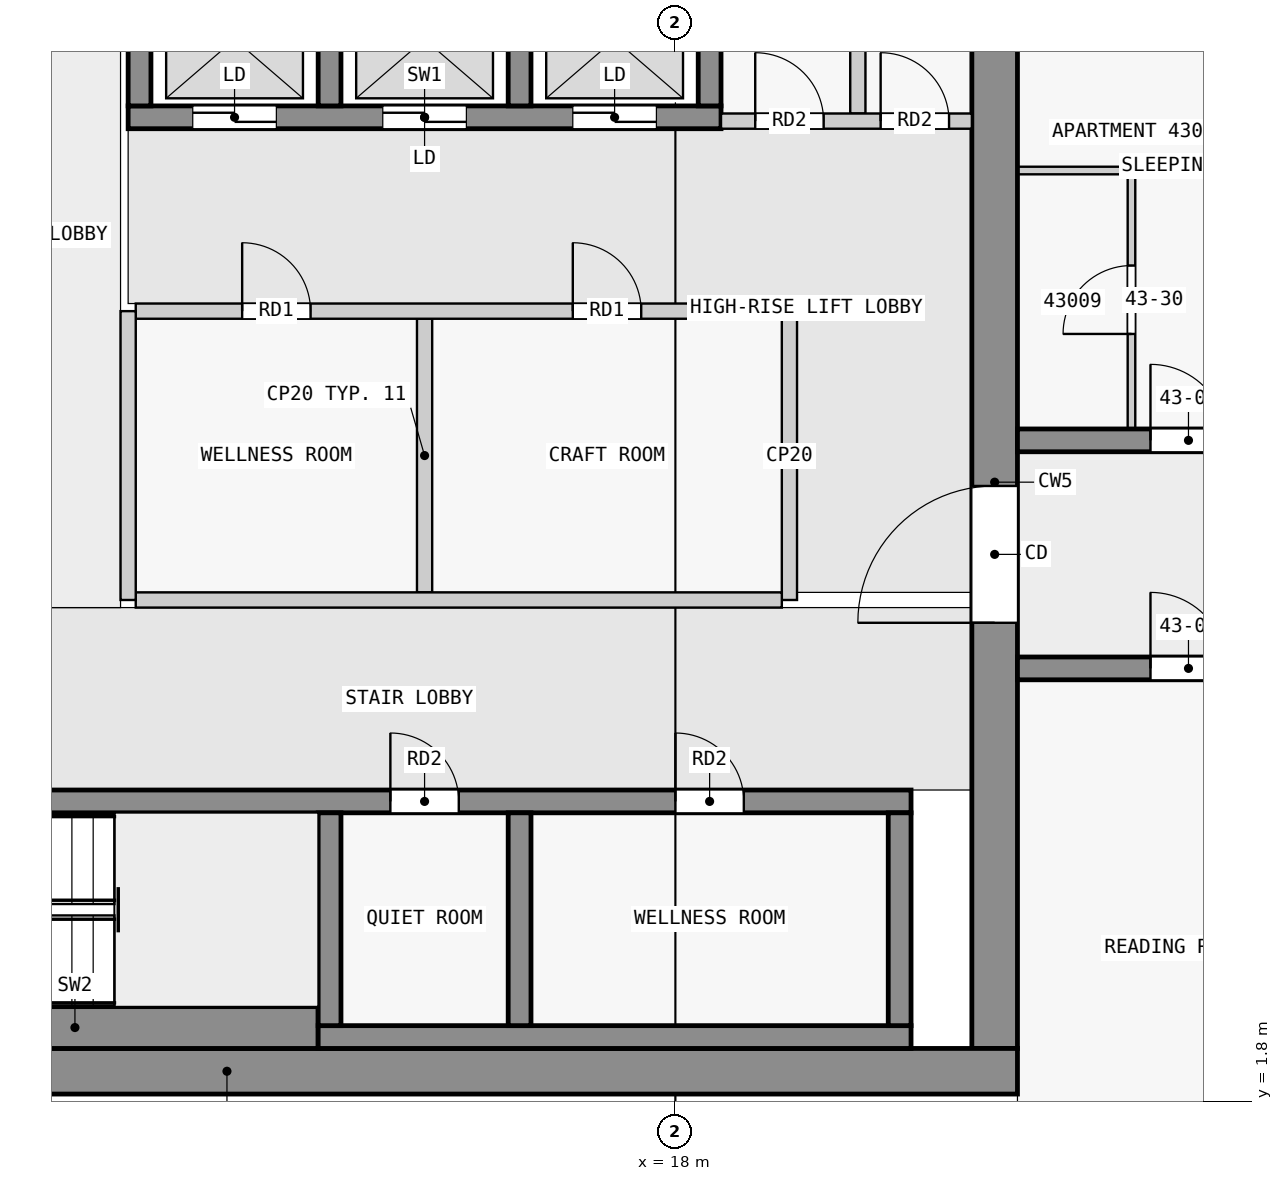
"""IFC4 building model, lengths in metres.
Left out: names, types, materials, properties, quantities, classifications, styles, units other than length and angle.
Written with IfcOpenShell. Run it as: python <this file> out.ifc"""

import sys

from ifc_helpers import new_model, si_unit, direction, frame, frame_2d, origin, place, context, subcontext, project, spatial, rectangle, extrude, element, fill, save


model = new_model("IFC4")
c1 = context("Model", 3, precision=1e-05, world=origin(), true_north=direction((0.0, 1.0)))
c2 = subcontext(c1, "Body", "Model", "MODEL_VIEW")
j1 = project(units=[si_unit("LENGTHUNIT", "METRE"), si_unit("PLANEANGLEUNIT", "RADIAN")], contexts=[c1])
p1 = place(None, origin())
s1 = spatial("IfcSite", under=j1, at=p1, CompositionType="ELEMENT")
p2 = place(p1, origin())
s2 = spatial("IfcBuilding", under=s1, at=p2, CompositionType="ELEMENT")
p3 = place(p2, frame((0.0, 0.0, 167.4)))
s3 = spatial("IfcBuildingStorey", under=s2, at=p3, CompositionType="ELEMENT", Elevation=167.4)
p4 = place(p3, frame((1.7, 2.2, 0.0), z_axis=(0.0, 0.0, 1.0), x_axis=(1.0, 0.0, 0.0)))
e1 = element("IfcWall", 1, at=p4, inside=s3, PredefinedType="SHEAR", context=c2, shape_type="SweptSolid", body=[
    extrude(rectangle(XDim=20.8, YDim=0.6, at=frame_2d((10.4, 0.0))), origin(), (0.0, 0.0, 1.0), 3.25),
])
p5 = place(p3, frame((22.2, 2.5, 0.0), z_axis=(0.0, 0.0, 1.0), x_axis=(0.0, 1.0, 0.0)))
e2 = element("IfcWall", 2, at=p5, inside=s3, PredefinedType="SHEAR", context=c2, shape_type="SweptSolid", body=[
    extrude(rectangle(XDim=14.9, YDim=0.6, at=frame_2d((7.45, 0.0))), origin(), (0.0, 0.0, 1.0), 3.25),
])
p6 = place(p5, frame((5.6, 0.0, 0.0)))
e3 = element("IfcOpeningElement", 3, at=p6, cuts=e2, PredefinedType="OPENING", context=c2, shape_type="SweptSolid", body=[
    extrude(rectangle(XDim=1.8, YDim=2.1, at=frame_2d((0.9, 1.05))), frame((0.0, 0.31, 0.0), z_axis=(0.0, -1.0, 0.0), x_axis=(1.0, 0.0, 0.0)), (0.0, 0.0, 1.0), 0.62),
])
p7 = place(p3, frame((6.9, 2.775, 0.0), z_axis=(0.0, 0.0, 1.0), x_axis=(1.0, 0.0, 0.0)))
e4 = element("IfcWall", 4, at=p7, inside=s3, PredefinedType="SHEAR", context=c2, shape_type="SweptSolid", body=[
    extrude(rectangle(XDim=6.4, YDim=0.55, at=frame_2d((3.2, 0.0))), origin(), (0.0, 0.0, 1.0), 3.25),
])
p8 = place(p3, frame((13.3, 2.65, 0.0), z_axis=(0.0, 0.0, 1.0), x_axis=(1.0, 0.0, 0.0)))
e5 = element("IfcWall", 5, at=p8, inside=s3, PredefinedType="SHEAR", context=c2, shape_type="SweptSolid", body=[
    extrude(rectangle(XDim=7.8, YDim=0.3, at=frame_2d((3.9, 0.0))), origin(), (0.0, 0.0, 1.0), 3.25),
])
for number, where, z_axis, x_axis in (
    (6, (13.45, 2.8, 0.0), (0.0, 0.0, 1.0), (0.0, 1.0, 0.0)),
    (7, (15.95, 2.8, 0.0), (0.0, 0.0, 1.0), (0.0, 1.0, 0.0)),
    (8, (20.95, 2.8, 0.0), (0.0, 0.0, 1.0), (0.0, 1.0, 0.0)),
):
    element("IfcWall", number, at=place(p3, frame(where, z_axis=z_axis, x_axis=x_axis)), inside=s3, PredefinedType="SHEAR", context=c2, shape_type="SweptSolid", body=[
        extrude(rectangle(XDim=2.8, YDim=0.3, at=frame_2d((1.4, 0.0))), origin(), (0.0, 0.0, 1.0), 3.25),
    ])
p9 = place(p3, frame((2.3, 5.75, 0.0), z_axis=(0.0, 0.0, 1.0), x_axis=(1.0, 0.0, 0.0)))
e9 = element("IfcWall", 9, at=p9, inside=s3, PredefinedType="SHEAR", context=c2, shape_type="SweptSolid", body=[
    extrude(rectangle(XDim=18.8, YDim=0.3, at=frame_2d((9.4, 0.0))), origin(), (0.0, 0.0, 1.0), 3.25),
])
p10 = place(p9, frame((4.65, 0.0, 0.0)))
e10 = element("IfcOpeningElement", 10, at=p10, cuts=e9, PredefinedType="OPENING", context=c2, shape_type="SweptSolid", body=[
    extrude(rectangle(XDim=1.1, YDim=2.1, at=frame_2d((0.55, 1.05))), frame((0.0, 0.16, 0.0), z_axis=(0.0, -1.0, 0.0), x_axis=(1.0, 0.0, 0.0)), (0.0, 0.0, 1.0), 0.32),
])
p11 = place(p9, frame((0.45, 0.0, 0.0)))
e11 = element("IfcOpeningElement", 11, at=p11, cuts=e9, PredefinedType="OPENING", context=c2, shape_type="SweptSolid", body=[
    extrude(rectangle(XDim=1.1, YDim=2.1, at=frame_2d((0.55, 1.05))), frame((0.0, 0.16, 0.0), z_axis=(0.0, -1.0, 0.0), x_axis=(1.0, 0.0, 0.0)), (0.0, 0.0, 1.0), 0.32),
])
p12 = place(p9, frame((2.75, 0.0, 0.0)))
e12 = element("IfcOpeningElement", 12, at=p12, cuts=e9, PredefinedType="OPENING", context=c2, shape_type="SweptSolid", body=[
    extrude(rectangle(XDim=1.1, YDim=2.1, at=frame_2d((0.55, 1.05))), frame((0.0, 0.16, 0.0), z_axis=(0.0, -1.0, 0.0), x_axis=(1.0, 0.0, 0.0)), (0.0, 0.0, 1.0), 0.32),
])
p13 = place(p9, frame((11.95, 0.0, 0.0)))
e13 = element("IfcOpeningElement", 13, at=p13, cuts=e9, PredefinedType="OPENING", context=c2, shape_type="SweptSolid", body=[
    extrude(rectangle(XDim=0.9, YDim=2.1, at=frame_2d((0.45, 1.05))), frame((0.0, 0.16, 0.0), z_axis=(0.0, -1.0, 0.0), x_axis=(1.0, 0.0, 0.0)), (0.0, 0.0, 1.0), 0.32),
])
p14 = place(p9, frame((15.7, 0.0, 0.0)))
e14 = element("IfcOpeningElement", 14, at=p14, cuts=e9, PredefinedType="OPENING", context=c2, shape_type="SweptSolid", body=[
    extrude(rectangle(XDim=0.9, YDim=2.1, at=frame_2d((0.45, 1.05))), frame((0.0, 0.16, 0.0), z_axis=(0.0, -1.0, 0.0), x_axis=(1.0, 0.0, 0.0)), (0.0, 0.0, 1.0), 0.32),
])
p15 = place(p3, frame((10.8, 14.75, 0.0), z_axis=(0.0, 0.0, 1.0), x_axis=(1.0, 0.0, 0.0)))
e15 = element("IfcWall", 15, at=p15, inside=s3, PredefinedType="SHEAR", context=c2, shape_type="SweptSolid", body=[
    extrude(rectangle(XDim=7.8, YDim=0.3, at=frame_2d((3.9, 0.0))), origin(), (0.0, 0.0, 1.0), 3.25),
])
p16 = place(p15, frame((0.85, 0.0, 0.0)))
e16 = element("IfcOpeningElement", 16, at=p16, cuts=e15, PredefinedType="OPENING", context=c2, shape_type="SweptSolid", body=[
    extrude(rectangle(XDim=1.1, YDim=2.1, at=frame_2d((0.55, 1.05))), frame((0.0, 0.16, 0.0), z_axis=(0.0, -1.0, 0.0), x_axis=(1.0, 0.0, 0.0)), (0.0, 0.0, 1.0), 0.32),
])
p17 = place(p15, frame((3.35, 0.0, 0.0)))
e17 = element("IfcOpeningElement", 17, at=p17, cuts=e15, PredefinedType="OPENING", context=c2, shape_type="SweptSolid", body=[
    extrude(rectangle(XDim=1.1, YDim=2.1, at=frame_2d((0.55, 1.05))), frame((0.0, 0.16, 0.0), z_axis=(0.0, -1.0, 0.0), x_axis=(1.0, 0.0, 0.0)), (0.0, 0.0, 1.0), 0.32),
])
p18 = place(p15, frame((5.85, 0.0, 0.0)))
e18 = element("IfcOpeningElement", 18, at=p18, cuts=e15, PredefinedType="OPENING", context=c2, shape_type="SweptSolid", body=[
    extrude(rectangle(XDim=1.1, YDim=2.1, at=frame_2d((0.55, 1.05))), frame((0.0, 0.16, 0.0), z_axis=(0.0, -1.0, 0.0), x_axis=(1.0, 0.0, 0.0)), (0.0, 0.0, 1.0), 0.32),
])
for number, where, z_axis, x_axis in (
    (19, (10.95, 14.9, 0.0), (0.0, 0.0, 1.0), (0.0, 1.0, 0.0)),
    (20, (13.45, 14.9, 0.0), (0.0, 0.0, 1.0), (0.0, 1.0, 0.0)),
    (21, (15.95, 14.9, 0.0), (0.0, 0.0, 1.0), (0.0, 1.0, 0.0)),
    (22, (18.45, 14.9, 0.0), (0.0, 0.0, 1.0), (0.0, 1.0, 0.0)),
):
    element("IfcWall", number, at=place(p3, frame(where, z_axis=z_axis, x_axis=x_axis)), inside=s3, PredefinedType="SHEAR", context=c2, shape_type="SweptSolid", body=[
        extrude(rectangle(XDim=2.0, YDim=0.3, at=frame_2d((1.0, 0.0))), origin(), (0.0, 0.0, 1.0), 3.25),
    ])
p19 = place(p3, frame((22.5, 7.5, 0.0), z_axis=(0.0, 0.0, 1.0), x_axis=(1.0, 0.0, 0.0)))
e23 = element("IfcWall", 23, at=p19, inside=s3, PredefinedType="SHEAR", context=c2, shape_type="SweptSolid", body=[
    extrude(rectangle(XDim=22.5, YDim=0.3, at=frame_2d((11.25, 0.0))), origin(), (0.0, 0.0, 1.0), 3.25),
])
p20 = place(p19, frame((1.75, 0.0, 0.0)))
e24 = element("IfcOpeningElement", 24, at=p20, cuts=e23, PredefinedType="OPENING", context=c2, shape_type="SweptSolid", body=[
    extrude(rectangle(XDim=1.0, YDim=2.1, at=frame_2d((0.5, 1.05))), frame((0.0, 0.16, 0.0), z_axis=(0.0, -1.0, 0.0), x_axis=(1.0, 0.0, 0.0)), (0.0, 0.0, 1.0), 0.32),
])
p21 = place(p19, frame((6.25, 0.0, 0.0)))
e25 = element("IfcOpeningElement", 25, at=p21, cuts=e23, PredefinedType="OPENING", context=c2, shape_type="SweptSolid", body=[
    extrude(rectangle(XDim=1.0, YDim=2.1, at=frame_2d((0.5, 1.05))), frame((0.0, 0.16, 0.0), z_axis=(0.0, -1.0, 0.0), x_axis=(1.0, 0.0, 0.0)), (0.0, 0.0, 1.0), 0.32),
])
p22 = place(p19, frame((10.75, 0.0, 0.0)))
e26 = element("IfcOpeningElement", 26, at=p22, cuts=e23, PredefinedType="OPENING", context=c2, shape_type="SweptSolid", body=[
    extrude(rectangle(XDim=1.0, YDim=2.1, at=frame_2d((0.5, 1.05))), frame((0.0, 0.16, 0.0), z_axis=(0.0, -1.0, 0.0), x_axis=(1.0, 0.0, 0.0)), (0.0, 0.0, 1.0), 0.32),
])
p23 = place(p19, frame((15.25, 0.0, 0.0)))
e27 = element("IfcOpeningElement", 27, at=p23, cuts=e23, PredefinedType="OPENING", context=c2, shape_type="SweptSolid", body=[
    extrude(rectangle(XDim=1.0, YDim=2.1, at=frame_2d((0.5, 1.05))), frame((0.0, 0.16, 0.0), z_axis=(0.0, -1.0, 0.0), x_axis=(1.0, 0.0, 0.0)), (0.0, 0.0, 1.0), 0.32),
])
p24 = place(p19, frame((18.75, 0.0, 0.0)))
e28 = element("IfcOpeningElement", 28, at=p24, cuts=e23, PredefinedType="OPENING", context=c2, shape_type="SweptSolid", body=[
    extrude(rectangle(XDim=0.9, YDim=2.1, at=frame_2d((0.45, 1.05))), frame((0.0, 0.16, 0.0), z_axis=(0.0, -1.0, 0.0), x_axis=(1.0, 0.0, 0.0)), (0.0, 0.0, 1.0), 0.32),
])
p25 = place(p19, frame((20.95, 0.0, 0.0)))
e29 = element("IfcOpeningElement", 29, at=p25, cuts=e23, PredefinedType="OPENING", context=c2, shape_type="SweptSolid", body=[
    extrude(rectangle(XDim=1.0, YDim=2.1, at=frame_2d((0.5, 1.05))), frame((0.0, 0.16, 0.0), z_axis=(0.0, -1.0, 0.0), x_axis=(1.0, 0.0, 0.0)), (0.0, 0.0, 1.0), 0.32),
])
p26 = place(p3, frame((22.5, 10.5, 0.0), z_axis=(0.0, 0.0, 1.0), x_axis=(1.0, 0.0, 0.0)))
e30 = element("IfcWall", 30, at=p26, inside=s3, PredefinedType="SHEAR", context=c2, shape_type="SweptSolid", body=[
    extrude(rectangle(XDim=22.5, YDim=0.3, at=frame_2d((11.25, 0.0))), origin(), (0.0, 0.0, 1.0), 3.25),
])
p27 = place(p26, frame((1.75, 0.0, 0.0)))
e31 = element("IfcOpeningElement", 31, at=p27, cuts=e30, PredefinedType="OPENING", context=c2, shape_type="SweptSolid", body=[
    extrude(rectangle(XDim=1.0, YDim=2.1, at=frame_2d((0.5, 1.05))), frame((0.0, 0.16, 0.0), z_axis=(0.0, -1.0, 0.0), x_axis=(1.0, 0.0, 0.0)), (0.0, 0.0, 1.0), 0.32),
])
p28 = place(p26, frame((6.25, 0.0, 0.0)))
e32 = element("IfcOpeningElement", 32, at=p28, cuts=e30, PredefinedType="OPENING", context=c2, shape_type="SweptSolid", body=[
    extrude(rectangle(XDim=1.0, YDim=2.1, at=frame_2d((0.5, 1.05))), frame((0.0, 0.16, 0.0), z_axis=(0.0, -1.0, 0.0), x_axis=(1.0, 0.0, 0.0)), (0.0, 0.0, 1.0), 0.32),
])
p29 = place(p26, frame((10.35, 0.0, 0.0)))
e33 = element("IfcOpeningElement", 33, at=p29, cuts=e30, PredefinedType="OPENING", context=c2, shape_type="SweptSolid", body=[
    extrude(rectangle(XDim=1.8, YDim=2.1, at=frame_2d((0.9, 1.05))), frame((0.0, 0.16, 0.0), z_axis=(0.0, -1.0, 0.0), x_axis=(1.0, 0.0, 0.0)), (0.0, 0.0, 1.0), 0.32),
])
p30 = place(p26, frame((16.85, 0.0, 0.0)))
e34 = element("IfcOpeningElement", 34, at=p30, cuts=e30, PredefinedType="OPENING", context=c2, shape_type="SweptSolid", body=[
    extrude(rectangle(XDim=1.0, YDim=2.1, at=frame_2d((0.5, 1.05))), frame((0.0, 0.16, 0.0), z_axis=(0.0, -1.0, 0.0), x_axis=(1.0, 0.0, 0.0)), (0.0, 0.0, 1.0), 0.32),
])
p31 = place(p3, frame((10.8, 8.4, 0.0), z_axis=(0.0, 0.0, 1.0), x_axis=(0.0, 1.0, 0.0)))
e35 = element("IfcWall", 35, at=p31, inside=s3, PredefinedType="PARTITIONING", context=c2, shape_type="SweptSolid", body=[
    extrude(rectangle(XDim=3.8, YDim=0.2, at=frame_2d((1.9, 0.0))), origin(), (0.0, 0.0, 1.0), 3.25),
])
p32 = place(p3, frame((10.9, 8.4, 0.0), z_axis=(0.0, 0.0, 1.0), x_axis=(1.0, 0.0, 0.0)))
e36 = element("IfcWall", 36, at=p32, inside=s3, PredefinedType="PARTITIONING", context=c2, shape_type="SweptSolid", body=[
    extrude(rectangle(XDim=8.5, YDim=0.2, at=frame_2d((4.25, 0.0))), origin(), (0.0, 0.0, 1.0), 3.25),
])
p33 = place(p3, frame((19.5, 8.4, 0.0), z_axis=(0.0, 0.0, 1.0), x_axis=(0.0, 1.0, 0.0)))
e37 = element("IfcWall", 37, at=p33, inside=s3, PredefinedType="PARTITIONING", context=c2, shape_type="SweptSolid", body=[
    extrude(rectangle(XDim=3.8, YDim=0.2, at=frame_2d((1.9, 0.0))), origin(), (0.0, 0.0, 1.0), 3.25),
])
p34 = place(p3, frame((10.9, 12.2, 0.0), z_axis=(0.0, 0.0, 1.0), x_axis=(1.0, 0.0, 0.0)))
e38 = element("IfcWall", 38, at=p34, inside=s3, PredefinedType="PARTITIONING", context=c2, shape_type="SweptSolid", body=[
    extrude(rectangle(XDim=8.5, YDim=0.2, at=frame_2d((4.25, 0.0))), origin(), (0.0, 0.0, 1.0), 3.25),
])
p35 = place(p34, frame((1.4, 0.0, 0.0)))
e39 = element("IfcOpeningElement", 39, at=p35, cuts=e38, PredefinedType="OPENING", context=c2, shape_type="SweptSolid", body=[
    extrude(rectangle(XDim=0.9, YDim=2.1, at=frame_2d((0.45, 1.05))), frame((0.0, 0.11, 0.0), z_axis=(0.0, -1.0, 0.0), x_axis=(1.0, 0.0, 0.0)), (0.0, 0.0, 1.0), 0.22),
])
p36 = place(p34, frame((5.75, 0.0, 0.0)))
e40 = element("IfcOpeningElement", 40, at=p36, cuts=e38, PredefinedType="OPENING", context=c2, shape_type="SweptSolid", body=[
    extrude(rectangle(XDim=0.9, YDim=2.1, at=frame_2d((0.45, 1.05))), frame((0.0, 0.11, 0.0), z_axis=(0.0, -1.0, 0.0), x_axis=(1.0, 0.0, 0.0)), (0.0, 0.0, 1.0), 0.22),
])
p37 = place(p3, frame((14.7, 8.5, 0.0), z_axis=(0.0, 0.0, 1.0), x_axis=(0.0, 1.0, 0.0)))
e41 = element("IfcWall", 41, at=p37, inside=s3, PredefinedType="PARTITIONING", context=c2, shape_type="SweptSolid", body=[
    extrude(rectangle(XDim=3.6, YDim=0.2, at=frame_2d((1.8, 0.0))), origin(), (0.0, 0.0, 1.0), 3.25),
])
p38 = place(p3, frame((18.6, 14.7, 0.0), z_axis=(0.0, 0.0, 1.0), x_axis=(1.0, 0.0, 0.0)))
e42 = element("IfcWall", 42, at=p38, inside=s3, PredefinedType="PARTITIONING", context=c2, shape_type="SweptSolid", body=[
    extrude(rectangle(XDim=3.3, YDim=0.2, at=frame_2d((1.65, 0.0))), origin(), (0.0, 0.0, 1.0), 3.25),
])
p39 = place(p38, frame((0.45, 0.0, 0.0)))
e43 = element("IfcOpeningElement", 43, at=p39, cuts=e42, PredefinedType="OPENING", context=c2, shape_type="SweptSolid", body=[
    extrude(rectangle(XDim=0.9, YDim=2.1, at=frame_2d((0.45, 1.05))), frame((0.0, 0.11, 0.0), z_axis=(0.0, -1.0, 0.0), x_axis=(1.0, 0.0, 0.0)), (0.0, 0.0, 1.0), 0.22),
])
p40 = place(p38, frame((2.1, 0.0, 0.0)))
e44 = element("IfcOpeningElement", 44, at=p40, cuts=e42, PredefinedType="OPENING", context=c2, shape_type="SweptSolid", body=[
    extrude(rectangle(XDim=0.9, YDim=2.1, at=frame_2d((0.45, 1.05))), frame((0.0, 0.11, 0.0), z_axis=(0.0, -1.0, 0.0), x_axis=(1.0, 0.0, 0.0)), (0.0, 0.0, 1.0), 0.22),
])
p41 = place(p3, frame((20.4, 14.8, 0.0), z_axis=(0.0, 0.0, 1.0), x_axis=(0.0, 1.0, 0.0)))
e45 = element("IfcWall", 45, at=p41, inside=s3, PredefinedType="PARTITIONING", context=c2, shape_type="SweptSolid", body=[
    extrude(rectangle(XDim=2.6, YDim=0.2, at=frame_2d((1.3, 0.0))), origin(), (0.0, 0.0, 1.0), 3.25),
])
p42 = place(p3, frame((23.95, 14.05, 0.0), z_axis=(0.0, 0.0, 1.0), x_axis=(-1.0, 0.0, 0.0)))
e46 = element("IfcWall", 46, at=p42, inside=s3, PredefinedType="PARTITIONING", context=c2, shape_type="SweptSolid", body=[
    extrude(rectangle(XDim=1.45, YDim=0.1, at=frame_2d((0.725, 0.0))), origin(), (0.0, 0.0, 1.0), 3.25),
])
p43 = place(p3, frame((24.0, 10.65, 0.0), z_axis=(0.0, 0.0, 1.0), x_axis=(0.0, 1.0, 0.0)))
e47 = element("IfcWall", 47, at=p43, inside=s3, PredefinedType="PARTITIONING", context=c2, shape_type="SweptSolid", body=[
    extrude(rectangle(XDim=3.4, YDim=0.1, at=frame_2d((1.7, 0.0))), origin(), (0.0, 0.0, 1.0), 3.25),
])
p44 = place(p43, frame((1.25, 0.0, 0.0)))
e48 = element("IfcOpeningElement", 48, at=p44, cuts=e47, PredefinedType="OPENING", context=c2, shape_type="SweptSolid", body=[
    extrude(rectangle(XDim=0.9, YDim=2.1, at=frame_2d((0.45, 1.05))), frame((0.0, 0.06, 0.0), z_axis=(0.0, -1.0, 0.0), x_axis=(1.0, 0.0, 0.0)), (0.0, 0.0, 1.0), 0.12),
])
p45 = place(p35, origin())
e49 = element("IfcDoor", 49, at=p45, inside=s3, OperationType="SINGLE_SWING_LEFT", PredefinedType="DOOR", context=c2, shape_type="SweptSolid", body=[
    extrude(rectangle(XDim=0.9, YDim=2.1, at=frame_2d((0.45, 1.05))), frame((0.0, 0.025, 0.0), z_axis=(0.0, -1.0, 0.0), x_axis=(1.0, 0.0, 0.0)), (0.0, 0.0, 1.0), 0.05),
])
fill(e39, e49)
p46 = place(p36, origin())
e50 = element("IfcDoor", 50, at=p46, inside=s3, OperationType="SINGLE_SWING_LEFT", PredefinedType="DOOR", context=c2, shape_type="SweptSolid", body=[
    extrude(rectangle(XDim=0.9, YDim=2.1, at=frame_2d((0.45, 1.05))), frame((0.0, 0.025, 0.0), z_axis=(0.0, -1.0, 0.0), x_axis=(1.0, 0.0, 0.0)), (0.0, 0.0, 1.0), 0.05),
])
fill(e40, e50)
p47 = place(p16, origin())
e51 = element("IfcDoor", 51, at=p47, inside=s3, OperationType="DOUBLE_DOOR_SLIDING", PredefinedType="DOOR", context=c2, shape_type="SweptSolid", body=[
    extrude(rectangle(XDim=1.1, YDim=2.1, at=frame_2d((0.55, 1.05))), frame((0.0, 0.025, 0.0), z_axis=(0.0, -1.0, 0.0), x_axis=(1.0, 0.0, 0.0)), (0.0, 0.0, 1.0), 0.05),
])
fill(e16, e51)
p48 = place(p17, origin())
e52 = element("IfcDoor", 52, at=p48, inside=s3, OperationType="DOUBLE_DOOR_SLIDING", PredefinedType="DOOR", context=c2, shape_type="SweptSolid", body=[
    extrude(rectangle(XDim=1.1, YDim=2.1, at=frame_2d((0.55, 1.05))), frame((0.0, 0.025, 0.0), z_axis=(0.0, -1.0, 0.0), x_axis=(1.0, 0.0, 0.0)), (0.0, 0.0, 1.0), 0.05),
])
fill(e17, e52)
p49 = place(p18, origin())
e53 = element("IfcDoor", 53, at=p49, inside=s3, OperationType="DOUBLE_DOOR_SLIDING", PredefinedType="DOOR", context=c2, shape_type="SweptSolid", body=[
    extrude(rectangle(XDim=1.1, YDim=2.1, at=frame_2d((0.55, 1.05))), frame((0.0, 0.025, 0.0), z_axis=(0.0, -1.0, 0.0), x_axis=(1.0, 0.0, 0.0)), (0.0, 0.0, 1.0), 0.05),
])
fill(e18, e53)
p50 = place(p6, origin())
e54 = element("IfcDoor", 54, at=p50, inside=s3, OperationType="DOUBLE_DOOR_SINGLE_SWING", PredefinedType="DOOR", context=c2, shape_type="SweptSolid", body=[
    extrude(rectangle(XDim=1.8, YDim=2.1, at=frame_2d((0.9, 1.05))), frame((0.0, 0.025, 0.0), z_axis=(0.0, -1.0, 0.0), x_axis=(1.0, 0.0, 0.0)), (0.0, 0.0, 1.0), 0.05),
])
fill(e3, e54)
p51 = place(p39, origin())
e55 = element("IfcDoor", 55, at=p51, inside=s3, OperationType="SINGLE_SWING_LEFT", PredefinedType="DOOR", context=c2, shape_type="SweptSolid", body=[
    extrude(rectangle(XDim=0.9, YDim=2.1, at=frame_2d((0.45, 1.05))), frame((0.0, 0.025, 0.0), z_axis=(0.0, -1.0, 0.0), x_axis=(1.0, 0.0, 0.0)), (0.0, 0.0, 1.0), 0.05),
])
fill(e43, e55)
p52 = place(p40, origin())
e56 = element("IfcDoor", 56, at=p52, inside=s3, OperationType="SINGLE_SWING_LEFT", PredefinedType="DOOR", context=c2, shape_type="SweptSolid", body=[
    extrude(rectangle(XDim=0.9, YDim=2.1, at=frame_2d((0.45, 1.05))), frame((0.0, 0.025, 0.0), z_axis=(0.0, -1.0, 0.0), x_axis=(1.0, 0.0, 0.0)), (0.0, 0.0, 1.0), 0.05),
])
fill(e44, e56)
p53 = place(p13, origin())
e57 = element("IfcDoor", 57, at=p53, inside=s3, OperationType="SINGLE_SWING_LEFT", PredefinedType="DOOR", context=c2, shape_type="SweptSolid", body=[
    extrude(rectangle(XDim=0.9, YDim=2.1, at=frame_2d((0.45, 1.05))), frame((0.0, 0.025, 0.0), z_axis=(0.0, -1.0, 0.0), x_axis=(1.0, 0.0, 0.0)), (0.0, 0.0, 1.0), 0.05),
])
fill(e13, e57)
p54 = place(p14, origin())
e58 = element("IfcDoor", 58, at=p54, inside=s3, OperationType="SINGLE_SWING_LEFT", PredefinedType="DOOR", context=c2, shape_type="SweptSolid", body=[
    extrude(rectangle(XDim=0.9, YDim=2.1, at=frame_2d((0.45, 1.05))), frame((0.0, 0.025, 0.0), z_axis=(0.0, -1.0, 0.0), x_axis=(1.0, 0.0, 0.0)), (0.0, 0.0, 1.0), 0.05),
])
fill(e14, e58)
p55 = place(p20, origin())
e59 = element("IfcDoor", 59, at=p55, inside=s3, OperationType="SINGLE_SWING_LEFT", PredefinedType="DOOR", context=c2, shape_type="SweptSolid", body=[
    extrude(rectangle(XDim=1.0, YDim=2.1, at=frame_2d((0.5, 1.05))), frame((0.0, 0.025, 0.0), z_axis=(0.0, -1.0, 0.0), x_axis=(1.0, 0.0, 0.0)), (0.0, 0.0, 1.0), 0.05),
])
fill(e24, e59)
p56 = place(p27, origin())
e60 = element("IfcDoor", 60, at=p56, inside=s3, OperationType="SINGLE_SWING_LEFT", PredefinedType="DOOR", context=c2, shape_type="SweptSolid", body=[
    extrude(rectangle(XDim=1.0, YDim=2.1, at=frame_2d((0.5, 1.05))), frame((0.0, 0.025, 0.0), z_axis=(0.0, -1.0, 0.0), x_axis=(1.0, 0.0, 0.0)), (0.0, 0.0, 1.0), 0.05),
])
fill(e31, e60)
p57 = place(p44, origin())
e61 = element("IfcDoor", 61, at=p57, inside=s3, OperationType="SINGLE_SWING_LEFT", PredefinedType="DOOR", context=c2, shape_type="SweptSolid", body=[
    extrude(rectangle(XDim=0.9, YDim=2.1, at=frame_2d((0.45, 1.05))), frame((0.0, 0.025, 0.0), z_axis=(0.0, -1.0, 0.0), x_axis=(1.0, 0.0, 0.0)), (0.0, 0.0, 1.0), 0.05),
])
fill(e48, e61)
save(model, sys.argv[1])
